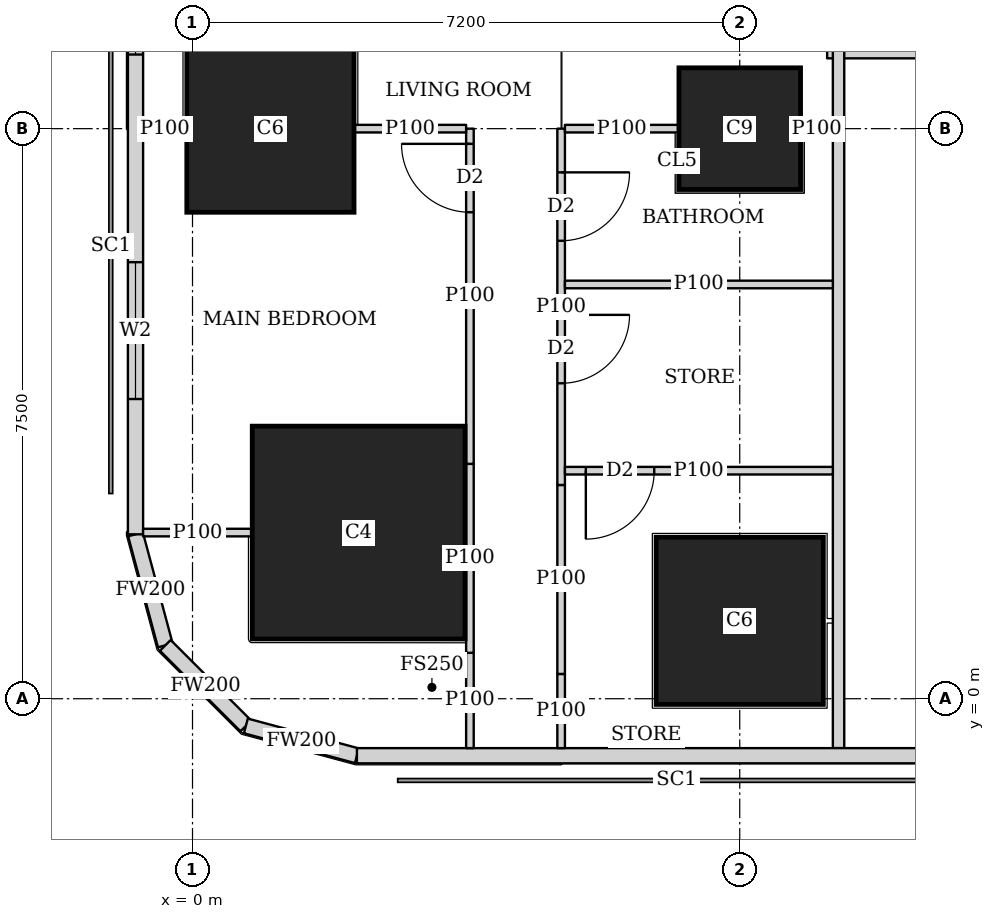
"""IFC4 building model, lengths in metres.
Left out: names, types, materials, properties, quantities, classifications, styles, units other than length and angle.
Written with IfcOpenShell. Run it as: python <this file> out.ifc"""

import sys

from ifc_helpers import new_model, si_unit, direction, frame, frame_2d, origin, origin_2d, place, context, subcontext, project, spatial, rectangle, extrude, element, fill, save


model = new_model("IFC4")
c1 = context("Model", 3, precision=1e-05, world=origin(), true_north=direction((0.0, 1.0)))
c2 = subcontext(c1, "Body", "Model", "MODEL_VIEW")
j1 = project(units=[si_unit("LENGTHUNIT", "METRE"), si_unit("PLANEANGLEUNIT", "RADIAN")], contexts=[c1])
p1 = place(None, origin())
s1 = spatial("IfcSite", under=j1, at=p1, CompositionType="ELEMENT")
p2 = place(p1, origin())
s2 = spatial("IfcBuilding", under=s1, at=p2, CompositionType="ELEMENT")
p3 = place(p2, frame((0.0, 0.0, 89.15)))
s3 = spatial("IfcBuildingStorey", under=s2, at=p3, CompositionType="ELEMENT", Elevation=89.15)
p4 = place(p3, frame((7.2, 1.025, 0.0), z_axis=(0.0, 0.0, 1.0), x_axis=(1.0, 0.0, 0.0)))
e1 = element("IfcColumn", 1, at=p4, inside=s3, PredefinedType="COLUMN", context=c2, shape_type="SweptSolid", body=[
    extrude(rectangle(XDim=2.2, YDim=2.2, at=origin_2d()), origin(), (0.0, 0.0, 1.0), 3.75),
])
p5 = place(p3, frame((2.186, 2.186, 0.0), z_axis=(0.0, 0.0, 1.0), x_axis=(1.0, 0.0, 0.0)))
e2 = element("IfcColumn", 2, at=p5, inside=s3, PredefinedType="COLUMN", context=c2, shape_type="SweptSolid", body=[
    extrude(rectangle(XDim=2.8, YDim=2.8, at=origin_2d()), origin(), (0.0, 0.0, 1.0), 3.75),
])
p6 = place(p3, frame((1.025, 7.5, 0.0), z_axis=(0.0, 0.0, 1.0), x_axis=(1.0, 0.0, 0.0)))
e3 = element("IfcColumn", 3, at=p6, inside=s3, PredefinedType="COLUMN", context=c2, shape_type="SweptSolid", body=[
    extrude(rectangle(XDim=2.2, YDim=2.2, at=origin_2d()), origin(), (0.0, 0.0, 1.0), 3.75),
])
p7 = place(p3, frame((7.2, 7.5, 0.0), z_axis=(0.0, 0.0, 1.0), x_axis=(1.0, 0.0, 0.0)))
e4 = element("IfcColumn", 4, at=p7, inside=s3, PredefinedType="COLUMN", context=c2, shape_type="SweptSolid", body=[
    extrude(rectangle(XDim=1.6, YDim=1.6, at=origin_2d()), origin(), (0.0, 0.0, 1.0), 3.75),
])
p8 = place(p3, frame((2.163, -0.75, 0.0), z_axis=(0.0, 0.0, 1.0), x_axis=(1.0, 0.0, 0.0)))
e5 = element("IfcWall", 5, at=p8, inside=s3, PredefinedType="SOLIDWALL", context=c2, shape_type="SweptSolid", body=[
    extrude(rectangle(XDim=45.628, YDim=0.2, at=frame_2d((22.814, 0.0))), origin(), (0.0, 0.0, 1.0), 3.5),
])
p9 = place(p8, frame((9.537, 0.0, 0.9)))
e6 = element("IfcOpeningElement", 6, at=p9, cuts=e5, PredefinedType="OPENING", context=c2, shape_type="SweptSolid", body=[
    extrude(rectangle(XDim=1.8, YDim=1.5, at=frame_2d((0.9, 0.75))), frame((0.0, 0.11, 0.0), z_axis=(0.0, -1.0, 0.0), x_axis=(1.0, 0.0, 0.0)), (0.0, 0.0, 1.0), 0.22),
])
p10 = place(p8, frame((13.137, 0.0, 0.9)))
e7 = element("IfcOpeningElement", 7, at=p10, cuts=e5, PredefinedType="OPENING", context=c2, shape_type="SweptSolid", body=[
    extrude(rectangle(XDim=1.8, YDim=1.5, at=frame_2d((0.9, 0.75))), frame((0.0, 0.11, 0.0), z_axis=(0.0, -1.0, 0.0), x_axis=(1.0, 0.0, 0.0)), (0.0, 0.0, 1.0), 0.22),
])
p11 = place(p8, frame((16.737, 0.0, 0.9)))
e8 = element("IfcOpeningElement", 8, at=p11, cuts=e5, PredefinedType="OPENING", context=c2, shape_type="SweptSolid", body=[
    extrude(rectangle(XDim=1.8, YDim=1.5, at=frame_2d((0.9, 0.75))), frame((0.0, 0.11, 0.0), z_axis=(0.0, -1.0, 0.0), x_axis=(1.0, 0.0, 0.0)), (0.0, 0.0, 1.0), 0.22),
])
p12 = place(p8, frame((20.337, 0.0, 0.9)))
e9 = element("IfcOpeningElement", 9, at=p12, cuts=e5, PredefinedType="OPENING", context=c2, shape_type="SweptSolid", body=[
    extrude(rectangle(XDim=1.8, YDim=1.5, at=frame_2d((0.9, 0.75))), frame((0.0, 0.11, 0.0), z_axis=(0.0, -1.0, 0.0), x_axis=(1.0, 0.0, 0.0)), (0.0, 0.0, 1.0), 0.22),
])
p13 = place(p8, frame((23.937, 0.0, 0.9)))
e10 = element("IfcOpeningElement", 10, at=p13, cuts=e5, PredefinedType="OPENING", context=c2, shape_type="SweptSolid", body=[
    extrude(rectangle(XDim=1.8, YDim=1.5, at=frame_2d((0.9, 0.75))), frame((0.0, 0.11, 0.0), z_axis=(0.0, -1.0, 0.0), x_axis=(1.0, 0.0, 0.0)), (0.0, 0.0, 1.0), 0.22),
])
p14 = place(p8, frame((27.537, 0.0, 0.9)))
e11 = element("IfcOpeningElement", 11, at=p14, cuts=e5, PredefinedType="OPENING", context=c2, shape_type="SweptSolid", body=[
    extrude(rectangle(XDim=1.8, YDim=1.5, at=frame_2d((0.9, 0.75))), frame((0.0, 0.11, 0.0), z_axis=(0.0, -1.0, 0.0), x_axis=(1.0, 0.0, 0.0)), (0.0, 0.0, 1.0), 0.22),
])
p15 = place(p8, frame((31.137, 0.0, 0.9)))
e12 = element("IfcOpeningElement", 12, at=p15, cuts=e5, PredefinedType="OPENING", context=c2, shape_type="SweptSolid", body=[
    extrude(rectangle(XDim=1.8, YDim=1.5, at=frame_2d((0.9, 0.75))), frame((0.0, 0.11, 0.0), z_axis=(0.0, -1.0, 0.0), x_axis=(1.0, 0.0, 0.0)), (0.0, 0.0, 1.0), 0.22),
])
p16 = place(p8, frame((34.737, 0.0, 0.9)))
e13 = element("IfcOpeningElement", 13, at=p16, cuts=e5, PredefinedType="OPENING", context=c2, shape_type="SweptSolid", body=[
    extrude(rectangle(XDim=1.8, YDim=1.5, at=frame_2d((0.9, 0.75))), frame((0.0, 0.11, 0.0), z_axis=(0.0, -1.0, 0.0), x_axis=(1.0, 0.0, 0.0)), (0.0, 0.0, 1.0), 0.22),
])
p17 = place(p3, frame((-0.75, 42.837, 0.0), z_axis=(0.0, 0.0, 1.0), x_axis=(0.0, -1.0, 0.0)))
e14 = element("IfcWall", 14, at=p17, inside=s3, PredefinedType="SOLIDWALL", context=c2, shape_type="SweptSolid", body=[
    extrude(rectangle(XDim=40.674, YDim=0.2, at=frame_2d((20.337, 0.0))), origin(), (0.0, 0.0, 1.0), 3.5),
])
p18 = place(p17, frame((1.78, 0.0, 0.9)))
e15 = element("IfcOpeningElement", 15, at=p18, cuts=e14, PredefinedType="OPENING", context=c2, shape_type="SweptSolid", body=[
    extrude(rectangle(XDim=1.8, YDim=1.5, at=frame_2d((0.9, 0.75))), frame((0.0, 0.11, 0.0), z_axis=(0.0, -1.0, 0.0), x_axis=(1.0, 0.0, 0.0)), (0.0, 0.0, 1.0), 0.22),
])
p19 = place(p17, frame((6.312, 0.0, 0.9)))
e16 = element("IfcOpeningElement", 16, at=p19, cuts=e14, PredefinedType="OPENING", context=c2, shape_type="SweptSolid", body=[
    extrude(rectangle(XDim=1.8, YDim=1.5, at=frame_2d((0.9, 0.75))), frame((0.0, 0.11, 0.0), z_axis=(0.0, -1.0, 0.0), x_axis=(1.0, 0.0, 0.0)), (0.0, 0.0, 1.0), 0.22),
])
p20 = place(p17, frame((10.062, 0.0, 0.9)))
e17 = element("IfcOpeningElement", 17, at=p20, cuts=e14, PredefinedType="OPENING", context=c2, shape_type="SweptSolid", body=[
    extrude(rectangle(XDim=1.8, YDim=1.5, at=frame_2d((0.9, 0.75))), frame((0.0, 0.11, 0.0), z_axis=(0.0, -1.0, 0.0), x_axis=(1.0, 0.0, 0.0)), (0.0, 0.0, 1.0), 0.22),
])
p21 = place(p17, frame((13.812, 0.0, 0.9)))
e18 = element("IfcOpeningElement", 18, at=p21, cuts=e14, PredefinedType="OPENING", context=c2, shape_type="SweptSolid", body=[
    extrude(rectangle(XDim=1.8, YDim=1.5, at=frame_2d((0.9, 0.75))), frame((0.0, 0.11, 0.0), z_axis=(0.0, -1.0, 0.0), x_axis=(1.0, 0.0, 0.0)), (0.0, 0.0, 1.0), 0.22),
])
p22 = place(p17, frame((17.562, 0.0, 0.9)))
e19 = element("IfcOpeningElement", 19, at=p22, cuts=e14, PredefinedType="OPENING", context=c2, shape_type="SweptSolid", body=[
    extrude(rectangle(XDim=1.8, YDim=1.5, at=frame_2d((0.9, 0.75))), frame((0.0, 0.11, 0.0), z_axis=(0.0, -1.0, 0.0), x_axis=(1.0, 0.0, 0.0)), (0.0, 0.0, 1.0), 0.22),
])
p23 = place(p17, frame((21.312, 0.0, 0.9)))
e20 = element("IfcOpeningElement", 20, at=p23, cuts=e14, PredefinedType="OPENING", context=c2, shape_type="SweptSolid", body=[
    extrude(rectangle(XDim=1.8, YDim=1.5, at=frame_2d((0.9, 0.75))), frame((0.0, 0.11, 0.0), z_axis=(0.0, -1.0, 0.0), x_axis=(1.0, 0.0, 0.0)), (0.0, 0.0, 1.0), 0.22),
])
p24 = place(p17, frame((25.062, 0.0, 0.9)))
e21 = element("IfcOpeningElement", 21, at=p24, cuts=e14, PredefinedType="OPENING", context=c2, shape_type="SweptSolid", body=[
    extrude(rectangle(XDim=1.8, YDim=1.5, at=frame_2d((0.9, 0.75))), frame((0.0, 0.11, 0.0), z_axis=(0.0, -1.0, 0.0), x_axis=(1.0, 0.0, 0.0)), (0.0, 0.0, 1.0), 0.22),
])
p25 = place(p17, frame((28.812, 0.0, 0.9)))
e22 = element("IfcOpeningElement", 22, at=p25, cuts=e14, PredefinedType="OPENING", context=c2, shape_type="SweptSolid", body=[
    extrude(rectangle(XDim=1.8, YDim=1.5, at=frame_2d((0.9, 0.75))), frame((0.0, 0.11, 0.0), z_axis=(0.0, -1.0, 0.0), x_axis=(1.0, 0.0, 0.0)), (0.0, 0.0, 1.0), 0.22),
])
p26 = place(p17, frame((32.562, 0.0, 0.9)))
e23 = element("IfcOpeningElement", 23, at=p26, cuts=e14, PredefinedType="OPENING", context=c2, shape_type="SweptSolid", body=[
    extrude(rectangle(XDim=1.8, YDim=1.5, at=frame_2d((0.9, 0.75))), frame((0.0, 0.11, 0.0), z_axis=(0.0, -1.0, 0.0), x_axis=(1.0, 0.0, 0.0)), (0.0, 0.0, 1.0), 0.22),
])
p27 = place(p17, frame((37.094, 0.0, 0.9)))
e24 = element("IfcOpeningElement", 24, at=p27, cuts=e14, PredefinedType="OPENING", context=c2, shape_type="SweptSolid", body=[
    extrude(rectangle(XDim=1.8, YDim=1.5, at=frame_2d((0.9, 0.75))), frame((0.0, 0.11, 0.0), z_axis=(0.0, -1.0, 0.0), x_axis=(1.0, 0.0, 0.0)), (0.0, 0.0, 1.0), 0.22),
])
p28 = place(p3, frame((-0.75, 2.163, 0.0), z_axis=(0.0, 0.0, 1.0), x_axis=(0.259168954497, -0.965832000415, 0.0)))
e25 = element("IfcWall", 25, at=p28, inside=s3, PredefinedType="SOLIDWALL", context=c2, shape_type="SweptSolid", body=[
    extrude(rectangle(XDim=1.513, YDim=0.2, at=frame_2d((0.756, 0.0))), origin(), (0.0, 0.0, 1.0), 3.5),
])
p29 = place(p3, frame((-0.358, 0.702, 0.0), z_axis=(0.0, 0.0, 1.0), x_axis=(0.707106781187, -0.707106781187, 0.0)))
e26 = element("IfcWall", 26, at=p29, inside=s3, PredefinedType="SOLIDWALL", context=c2, shape_type="SweptSolid", body=[
    extrude(rectangle(XDim=1.499, YDim=0.2, at=frame_2d((0.75, 0.0))), origin(), (0.0, 0.0, 1.0), 3.5),
])
p30 = place(p3, frame((0.702, -0.358, 0.0), z_axis=(0.0, 0.0, 1.0), x_axis=(0.965832000415, -0.259168954497, 0.0)))
e27 = element("IfcWall", 27, at=p30, inside=s3, PredefinedType="SOLIDWALL", context=c2, shape_type="SweptSolid", body=[
    extrude(rectangle(XDim=1.513, YDim=0.2, at=frame_2d((0.756, 0.0))), origin(), (0.0, 0.0, 1.0), 3.5),
])
p31 = place(p3, frame((8.5, -0.65, 0.0), z_axis=(0.0, 0.0, 1.0), x_axis=(0.0, 1.0, 0.0)))
e28 = element("IfcWall", 28, at=p31, inside=s3, PredefinedType="SOLIDWALL", context=c2, shape_type="SweptSolid", body=[
    extrude(rectangle(XDim=46.3, YDim=0.15, at=frame_2d((23.15, 0.0))), origin(), (0.0, 0.0, 1.0), 2.2),
])
p32 = place(p31, frame((9.525, 0.0, 0.0)))
e29 = element("IfcOpeningElement", 29, at=p32, cuts=e28, PredefinedType="OPENING", context=c2, shape_type="SweptSolid", body=[
    extrude(rectangle(XDim=1.0, YDim=2.1, at=frame_2d((0.5, 1.05))), frame((0.0, 0.085, 0.0), z_axis=(0.0, -1.0, 0.0), x_axis=(1.0, 0.0, 0.0)), (0.0, 0.0, 1.0), 0.17),
])
p33 = place(p31, frame((13.275, 0.0, 0.0)))
e30 = element("IfcOpeningElement", 30, at=p33, cuts=e28, PredefinedType="OPENING", context=c2, shape_type="SweptSolid", body=[
    extrude(rectangle(XDim=1.0, YDim=2.1, at=frame_2d((0.5, 1.05))), frame((0.0, 0.085, 0.0), z_axis=(0.0, -1.0, 0.0), x_axis=(1.0, 0.0, 0.0)), (0.0, 0.0, 1.0), 0.17),
])
p34 = place(p31, frame((20.775, 0.0, 0.0)))
e31 = element("IfcOpeningElement", 31, at=p34, cuts=e28, PredefinedType="OPENING", context=c2, shape_type="SweptSolid", body=[
    extrude(rectangle(XDim=1.0, YDim=2.1, at=frame_2d((0.5, 1.05))), frame((0.0, 0.085, 0.0), z_axis=(0.0, -1.0, 0.0), x_axis=(1.0, 0.0, 0.0)), (0.0, 0.0, 1.0), 0.17),
])
p35 = place(p31, frame((32.025, 0.0, 0.0)))
e32 = element("IfcOpeningElement", 32, at=p35, cuts=e28, PredefinedType="OPENING", context=c2, shape_type="SweptSolid", body=[
    extrude(rectangle(XDim=1.0, YDim=2.1, at=frame_2d((0.5, 1.05))), frame((0.0, 0.085, 0.0), z_axis=(0.0, -1.0, 0.0), x_axis=(1.0, 0.0, 0.0)), (0.0, 0.0, 1.0), 0.17),
])
p36 = place(p3, frame((40.053, 8.5, 0.0), z_axis=(0.0, 0.0, 1.0), x_axis=(-1.0, 0.0, 0.0)))
e33 = element("IfcWall", 33, at=p36, inside=s3, PredefinedType="SOLIDWALL", context=c2, shape_type="SweptSolid", body=[
    extrude(rectangle(XDim=31.703, YDim=0.15, at=frame_2d((15.852, 0.0))), origin(), (0.0, 0.0, 1.0), 3.5),
])
p37 = place(p36, frame((28.103, 0.0, 0.0)))
e34 = element("IfcOpeningElement", 34, at=p37, cuts=e33, PredefinedType="OPENING", context=c2, shape_type="SweptSolid", body=[
    extrude(rectangle(XDim=1.0, YDim=2.1, at=frame_2d((0.5, 1.05))), frame((0.0, 0.085, 0.0), z_axis=(0.0, -1.0, 0.0), x_axis=(1.0, 0.0, 0.0)), (0.0, 0.0, 1.0), 0.17),
])
p38 = place(p36, frame((19.953, 0.0, 0.0)))
e35 = element("IfcOpeningElement", 35, at=p38, cuts=e33, PredefinedType="OPENING", context=c2, shape_type="SweptSolid", body=[
    extrude(rectangle(XDim=1.0, YDim=2.1, at=frame_2d((0.5, 1.05))), frame((0.0, 0.085, 0.0), z_axis=(0.0, -1.0, 0.0), x_axis=(1.0, 0.0, 0.0)), (0.0, 0.0, 1.0), 0.17),
])
p39 = place(p36, frame((12.753, 0.0, 0.0)))
e36 = element("IfcOpeningElement", 36, at=p39, cuts=e33, PredefinedType="OPENING", context=c2, shape_type="SweptSolid", body=[
    extrude(rectangle(XDim=1.0, YDim=2.1, at=frame_2d((0.5, 1.05))), frame((0.0, 0.085, 0.0), z_axis=(0.0, -1.0, 0.0), x_axis=(1.0, 0.0, 0.0)), (0.0, 0.0, 1.0), 0.17),
])
p40 = place(p36, frame((0.15, 0.0, 0.0)))
e37 = element("IfcOpeningElement", 37, at=p40, cuts=e33, PredefinedType="OPENING", context=c2, shape_type="SweptSolid", body=[
    extrude(rectangle(XDim=1.0, YDim=2.1, at=frame_2d((0.5, 1.05))), frame((0.0, 0.085, 0.0), z_axis=(0.0, -1.0, 0.0), x_axis=(1.0, 0.0, 0.0)), (0.0, 0.0, 1.0), 0.17),
])
p41 = place(p3, frame((3.65, -0.65, 0.0), z_axis=(0.0, 0.0, 1.0), x_axis=(0.0, 1.0, 0.0)))
e38 = element("IfcWall", 38, at=p41, inside=s3, PredefinedType="PARTITIONING", context=c2, shape_type="SweptSolid", body=[
    extrude(rectangle(XDim=1.254, YDim=0.1, at=frame_2d((0.627, 0.0))), origin(), (0.0, 0.0, 1.0), 3.5),
])
p42 = place(p3, frame((3.65, 0.604, 0.0), z_axis=(0.0, 0.0, 1.0), x_axis=(0.0, 1.0, 0.0)))
e39 = element("IfcWall", 39, at=p42, inside=s3, PredefinedType="PARTITIONING", context=c2, shape_type="SweptSolid", body=[
    extrude(rectangle(XDim=2.486, YDim=0.1, at=frame_2d((1.243, 0.0))), origin(), (0.0, 0.0, 1.0), 2.05),
])
p43 = place(p3, frame((3.65, 3.09, 0.0), z_axis=(0.0, 0.0, 1.0), x_axis=(0.0, 1.0, 0.0)))
e40 = element("IfcWall", 40, at=p43, inside=s3, PredefinedType="PARTITIONING", context=c2, shape_type="SweptSolid", body=[
    extrude(rectangle(XDim=4.41, YDim=0.1, at=frame_2d((2.205, 0.0))), origin(), (0.0, 0.0, 1.0), 3.5),
])
p44 = place(p43, frame((3.31, 0.0, 0.0)))
e41 = element("IfcOpeningElement", 41, at=p44, cuts=e40, PredefinedType="OPENING", context=c2, shape_type="SweptSolid", body=[
    extrude(rectangle(XDim=0.9, YDim=2.1, at=frame_2d((0.45, 1.05))), frame((0.0, 0.06, 0.0), z_axis=(0.0, -1.0, 0.0), x_axis=(1.0, 0.0, 0.0)), (0.0, 0.0, 1.0), 0.12),
])
p45 = place(p3, frame((4.85, -0.65, 0.0), z_axis=(0.0, 0.0, 1.0), x_axis=(0.0, 1.0, 0.0)))
e42 = element("IfcWall", 42, at=p45, inside=s3, PredefinedType="PARTITIONING", context=c2, shape_type="SweptSolid", body=[
    extrude(rectangle(XDim=0.976, YDim=0.1, at=frame_2d((0.488, 0.0))), origin(), (0.0, 0.0, 1.0), 3.5),
])
p46 = place(p3, frame((4.85, 0.326, 0.0), z_axis=(0.0, 0.0, 1.0), x_axis=(0.0, 1.0, 0.0)))
e43 = element("IfcWall", 43, at=p46, inside=s3, PredefinedType="PARTITIONING", context=c2, shape_type="SweptSolid", body=[
    extrude(rectangle(XDim=2.486, YDim=0.1, at=frame_2d((1.243, 0.0))), origin(), (0.0, 0.0, 1.0), 2.05),
])
p47 = place(p3, frame((4.85, 2.812, 0.0), z_axis=(0.0, 0.0, 1.0), x_axis=(0.0, 1.0, 0.0)))
e44 = element("IfcWall", 44, at=p47, inside=s3, PredefinedType="PARTITIONING", context=c2, shape_type="SweptSolid", body=[
    extrude(rectangle(XDim=4.688, YDim=0.1, at=frame_2d((2.344, 0.0))), origin(), (0.0, 0.0, 1.0), 3.5),
])
p48 = place(p47, frame((3.213, 0.0, 0.0)))
e45 = element("IfcOpeningElement", 45, at=p48, cuts=e44, PredefinedType="OPENING", context=c2, shape_type="SweptSolid", body=[
    extrude(rectangle(XDim=0.9, YDim=2.1, at=frame_2d((0.45, 1.05))), frame((0.0, 0.06, 0.0), z_axis=(0.0, -1.0, 0.0), x_axis=(1.0, 0.0, 0.0)), (0.0, 0.0, 1.0), 0.12),
])
p49 = place(p47, frame((1.338, 0.0, 0.0)))
e46 = element("IfcOpeningElement", 46, at=p49, cuts=e44, PredefinedType="OPENING", context=c2, shape_type="SweptSolid", body=[
    extrude(rectangle(XDim=0.9, YDim=2.1, at=frame_2d((0.45, 1.05))), frame((0.0, 0.06, 0.0), z_axis=(0.0, -1.0, 0.0), x_axis=(1.0, 0.0, 0.0)), (0.0, 0.0, 1.0), 0.12),
])
p50 = place(p3, frame((-0.65, 2.186, 0.0), z_axis=(0.0, 0.0, 1.0), x_axis=(1.0, 0.0, 0.0)))
e47 = element("IfcWall", 47, at=p50, inside=s3, PredefinedType="PARTITIONING", context=c2, shape_type="SweptSolid", body=[
    extrude(rectangle(XDim=1.435, YDim=0.1, at=frame_2d((0.717, 0.0))), origin(), (0.0, 0.0, 1.0), 3.5),
])
p51 = place(p3, frame((-0.65, 7.5, 0.0), z_axis=(0.0, 0.0, 1.0), x_axis=(1.0, 0.0, 0.0)))
e48 = element("IfcWall", 48, at=p51, inside=s3, PredefinedType="PARTITIONING", context=c2, shape_type="SweptSolid", body=[
    extrude(rectangle(XDim=0.574, YDim=0.1, at=frame_2d((0.287, 0.0))), origin(), (0.0, 0.0, 1.0), 2.05),
])
p52 = place(p3, frame((2.126, 7.5, 0.0), z_axis=(0.0, 0.0, 1.0), x_axis=(1.0, 0.0, 0.0)))
e49 = element("IfcWall", 49, at=p52, inside=s3, PredefinedType="PARTITIONING", context=c2, shape_type="SweptSolid", body=[
    extrude(rectangle(XDim=1.474, YDim=0.1, at=frame_2d((0.737, 0.0))), origin(), (0.0, 0.0, 1.0), 2.05),
])
p53 = place(p3, frame((4.9, 7.5, 0.0), z_axis=(0.0, 0.0, 1.0), x_axis=(1.0, 0.0, 0.0)))
e50 = element("IfcWall", 50, at=p53, inside=s3, PredefinedType="PARTITIONING", context=c2, shape_type="SweptSolid", body=[
    extrude(rectangle(XDim=1.499, YDim=0.1, at=frame_2d((0.75, 0.0))), origin(), (0.0, 0.0, 1.0), 3.5),
])
p54 = place(p3, frame((8.001, 7.5, 0.0), z_axis=(0.0, 0.0, 1.0), x_axis=(1.0, 0.0, 0.0)))
e51 = element("IfcWall", 51, at=p54, inside=s3, PredefinedType="PARTITIONING", context=c2, shape_type="SweptSolid", body=[
    extrude(rectangle(XDim=0.424, YDim=0.1, at=frame_2d((0.212, 0.0))), origin(), (0.0, 0.0, 1.0), 3.5),
])
p55 = place(p3, frame((4.9, 5.45, 0.0), z_axis=(0.0, 0.0, 1.0), x_axis=(1.0, 0.0, 0.0)))
e52 = element("IfcWall", 52, at=p55, inside=s3, PredefinedType="PARTITIONING", context=c2, shape_type="SweptSolid", body=[
    extrude(rectangle(XDim=3.525, YDim=0.1, at=frame_2d((1.763, 0.0))), origin(), (0.0, 0.0, 1.0), 3.5),
])
p56 = place(p3, frame((8.425, 3.0, 0.0), z_axis=(0.0, 0.0, 1.0), x_axis=(-1.0, 0.0, 0.0)))
e53 = element("IfcWall", 53, at=p56, inside=s3, PredefinedType="PARTITIONING", context=c2, shape_type="SweptSolid", body=[
    extrude(rectangle(XDim=3.525, YDim=0.1, at=frame_2d((1.763, 0.0))), origin(), (0.0, 0.0, 1.0), 3.5),
])
p57 = place(p56, frame((2.35, 0.0, 0.0)))
e54 = element("IfcOpeningElement", 54, at=p57, cuts=e53, PredefinedType="OPENING", context=c2, shape_type="SweptSolid", body=[
    extrude(rectangle(XDim=0.9, YDim=2.1, at=frame_2d((0.45, 1.05))), frame((0.0, 0.06, 0.0), z_axis=(0.0, -1.0, 0.0), x_axis=(1.0, 0.0, 0.0)), (0.0, 0.0, 1.0), 0.12),
])
p58 = place(p26, origin())
e55 = element("IfcWindow", 55, at=p58, inside=s3, PartitioningType="SINGLE_PANEL", PredefinedType="WINDOW", context=c2, shape_type="SweptSolid", body=[
    extrude(rectangle(XDim=1.8, YDim=1.5, at=frame_2d((0.9, 0.75))), frame((0.0, 0.03, 0.0), z_axis=(0.0, -1.0, 0.0), x_axis=(1.0, 0.0, 0.0)), (0.0, 0.0, 1.0), 0.06),
])
fill(e23, e55)
p59 = place(p27, origin())
e56 = element("IfcWindow", 56, at=p59, inside=s3, PartitioningType="SINGLE_PANEL", PredefinedType="WINDOW", context=c2, shape_type="SweptSolid", body=[
    extrude(rectangle(XDim=1.8, YDim=1.5, at=frame_2d((0.9, 0.75))), frame((0.0, 0.03, 0.0), z_axis=(0.0, -1.0, 0.0), x_axis=(1.0, 0.0, 0.0)), (0.0, 0.0, 1.0), 0.06),
])
fill(e24, e56)
p60 = place(p44, origin())
e57 = element("IfcDoor", 57, at=p60, inside=s3, OperationType="SINGLE_SWING_RIGHT", PredefinedType="DOOR", context=c2, shape_type="SweptSolid", body=[
    extrude(rectangle(XDim=0.9, YDim=2.1, at=frame_2d((0.45, 1.05))), frame((0.0, 0.025, 0.0), z_axis=(0.0, -1.0, 0.0), x_axis=(1.0, 0.0, 0.0)), (0.0, 0.0, 1.0), 0.05),
])
fill(e41, e57)
p61 = place(p48, origin())
e58 = element("IfcDoor", 58, at=p61, inside=s3, OperationType="SINGLE_SWING_LEFT", PredefinedType="DOOR", context=c2, shape_type="SweptSolid", body=[
    extrude(rectangle(XDim=0.9, YDim=2.1, at=frame_2d((0.45, 1.05))), frame((0.0, 0.025, 0.0), z_axis=(0.0, -1.0, 0.0), x_axis=(1.0, 0.0, 0.0)), (0.0, 0.0, 1.0), 0.05),
])
fill(e45, e58)
p62 = place(p49, origin())
e59 = element("IfcDoor", 59, at=p62, inside=s3, OperationType="SINGLE_SWING_LEFT", PredefinedType="DOOR", context=c2, shape_type="SweptSolid", body=[
    extrude(rectangle(XDim=0.9, YDim=2.1, at=frame_2d((0.45, 1.05))), frame((0.0, 0.025, 0.0), z_axis=(0.0, -1.0, 0.0), x_axis=(1.0, 0.0, 0.0)), (0.0, 0.0, 1.0), 0.05),
])
fill(e46, e59)
p63 = place(p57, origin())
e60 = element("IfcDoor", 60, at=p63, inside=s3, OperationType="SINGLE_SWING_RIGHT", PredefinedType="DOOR", context=c2, shape_type="SweptSolid", body=[
    extrude(rectangle(XDim=0.9, YDim=2.1, at=frame_2d((0.45, 1.05))), frame((0.0, 0.025, 0.0), z_axis=(0.0, -1.0, 0.0), x_axis=(1.0, 0.0, 0.0)), (0.0, 0.0, 1.0), 0.05),
])
fill(e54, e60)
save(model, sys.argv[1])
